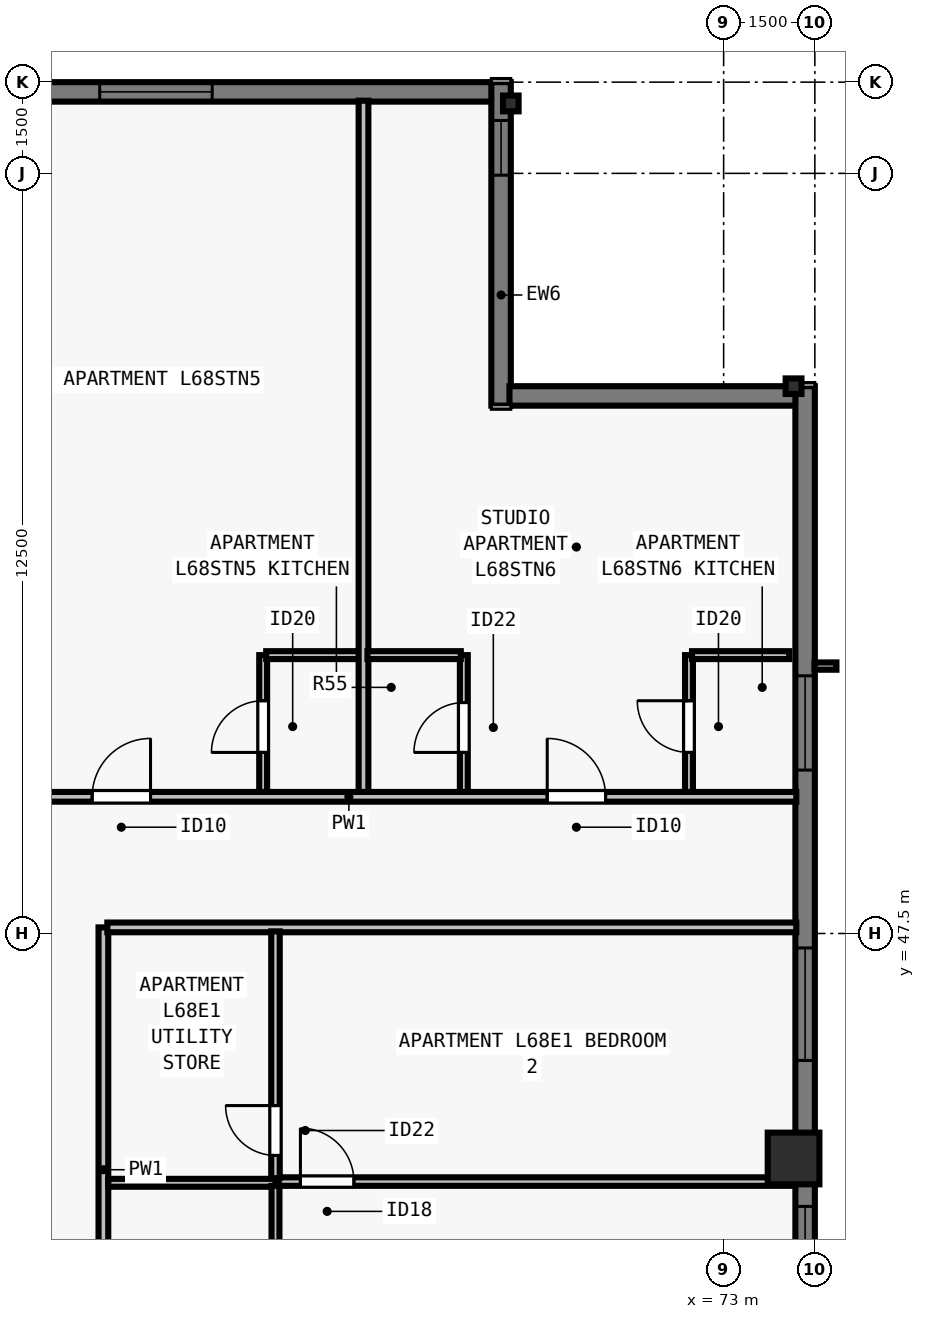
"""IFC4 building model, lengths in metres.
Left out: names, types, materials, properties, quantities, classifications, styles, units other than length and angle.
Written with IfcOpenShell. Run it as: python <this file> out.ifc"""

import sys

from ifc_helpers import new_model, si_unit, direction, frame, frame_2d, origin, origin_2d, place, context, subcontext, project, spatial, rectangle, i_section, extrude, element, fill, save


model = new_model("IFC4")
c1 = context("Model", 3, precision=1e-05, world=origin(), true_north=direction((0.0, 1.0)))
c2 = subcontext(c1, "Body", "Model", "MODEL_VIEW")
j1 = project(units=[si_unit("LENGTHUNIT", "METRE"), si_unit("PLANEANGLEUNIT", "RADIAN")], contexts=[c1])
p1 = place(None, origin())
s1 = spatial("IfcSite", under=j1, at=p1, CompositionType="ELEMENT")
p2 = place(p1, origin())
s2 = spatial("IfcBuilding", under=s1, at=p2, CompositionType="ELEMENT")
p3 = place(p2, frame((0.0, 0.0, 248.0)))
s3 = spatial("IfcBuildingStorey", under=s2, at=p3, CompositionType="ELEMENT", Elevation=248.0)
p4 = place(p3, frame((74.15, 43.8, 0.0), z_axis=(0.0, 0.0, 1.0), x_axis=(0.0, 1.0, 0.0)))
e1 = element("IfcColumn", 1, at=p4, inside=s3, PredefinedType="COLUMN", context=c2, shape_type="SweptSolid", body=[
    extrude(rectangle(XDim=0.85, YDim=0.85, at=origin_2d()), origin(), (0.0, 0.0, 1.0), 3.5),
])
for number, where, z_axis, x_axis in (
    (2, (74.15, 56.5, 0.0), (0.0, 0.0, 1.0), (0.0, 1.0, 0.0)),
    (3, (69.5, 61.15, 0.0), (0.0, 0.0, 1.0), (1.0, 0.0, 0.0)),
):
    element("IfcColumn", number, at=place(p3, frame(where, z_axis=z_axis, x_axis=x_axis)), inside=s3, PredefinedType="COLUMN", context=c2, shape_type="SweptSolid", body=[
        extrude(i_section(OverallWidth=0.256, OverallDepth=0.26, WebThickness=0.01, FlangeThickness=0.017, FilletRadius=0.013, at=origin_2d()), origin(), (0.0, 0.0, 1.0), 3.5),
    ])
p5 = place(p3, frame((34.5, 61.34, 0.0), z_axis=(0.0, 0.0, 1.0), x_axis=(1.0, 0.0, 0.0)))
e4 = element("IfcWall", 4, at=p5, inside=s3, PredefinedType="SOLIDWALL", context=c2, shape_type="SweptSolid", body=[
    extrude(rectangle(XDim=34.702, YDim=0.32, at=frame_2d((17.351, 0.0))), origin(), (0.0, 0.0, 1.0), 3.29),
])
p6 = place(p5, frame((4.763, 0.0, 0.8)))
e5 = element("IfcOpeningElement", 5, at=p6, cuts=e4, PredefinedType="OPENING", context=c2, shape_type="SweptSolid", body=[
    extrude(rectangle(XDim=1.55, YDim=1.678, at=frame_2d((0.775, 0.839))), frame((0.0, 0.17, 0.0), z_axis=(0.0, -1.0, 0.0), x_axis=(1.0, 0.0, 0.0)), (0.0, 0.0, 1.0), 0.34),
])
p7 = place(p5, frame((7.538, 0.0, 0.8)))
e6 = element("IfcOpeningElement", 6, at=p7, cuts=e4, PredefinedType="OPENING", context=c2, shape_type="SweptSolid", body=[
    extrude(rectangle(XDim=1.85, YDim=1.678, at=frame_2d((0.925, 0.839))), frame((0.0, 0.17, 0.0), z_axis=(0.0, -1.0, 0.0), x_axis=(1.0, 0.0, 0.0)), (0.0, 0.0, 1.0), 0.34),
])
p8 = place(p5, frame((10.263, 0.0, 0.8)))
e7 = element("IfcOpeningElement", 7, at=p8, cuts=e4, PredefinedType="OPENING", context=c2, shape_type="SweptSolid", body=[
    extrude(rectangle(XDim=1.55, YDim=1.678, at=frame_2d((0.775, 0.839))), frame((0.0, 0.17, 0.0), z_axis=(0.0, -1.0, 0.0), x_axis=(1.0, 0.0, 0.0)), (0.0, 0.0, 1.0), 0.34),
])
p9 = place(p5, frame((14.738, 0.0, 0.8)))
e8 = element("IfcOpeningElement", 8, at=p9, cuts=e4, PredefinedType="OPENING", context=c2, shape_type="SweptSolid", body=[
    extrude(rectangle(XDim=1.85, YDim=1.678, at=frame_2d((0.925, 0.839))), frame((0.0, 0.17, 0.0), z_axis=(0.0, -1.0, 0.0), x_axis=(1.0, 0.0, 0.0)), (0.0, 0.0, 1.0), 0.34),
])
p10 = place(p5, frame((18.264, 0.0, 0.8)))
e9 = element("IfcOpeningElement", 9, at=p10, cuts=e4, PredefinedType="OPENING", context=c2, shape_type="SweptSolid", body=[
    extrude(rectangle(XDim=1.55, YDim=1.678, at=frame_2d((0.775, 0.839))), frame((0.0, 0.17, 0.0), z_axis=(0.0, -1.0, 0.0), x_axis=(1.0, 0.0, 0.0)), (0.0, 0.0, 1.0), 0.34),
])
p11 = place(p5, frame((25.014, 0.0, 0.8)))
e10 = element("IfcOpeningElement", 10, at=p11, cuts=e4, PredefinedType="OPENING", context=c2, shape_type="SweptSolid", body=[
    extrude(rectangle(XDim=1.55, YDim=1.678, at=frame_2d((0.775, 0.839))), frame((0.0, 0.17, 0.0), z_axis=(0.0, -1.0, 0.0), x_axis=(1.0, 0.0, 0.0)), (0.0, 0.0, 1.0), 0.34),
])
p12 = place(p5, frame((28.24, 0.0, 0.8)))
e11 = element("IfcOpeningElement", 11, at=p12, cuts=e4, PredefinedType="OPENING", context=c2, shape_type="SweptSolid", body=[
    extrude(rectangle(XDim=1.85, YDim=1.678, at=frame_2d((0.925, 0.839))), frame((0.0, 0.17, 0.0), z_axis=(0.0, -1.0, 0.0), x_axis=(1.0, 0.0, 0.0)), (0.0, 0.0, 1.0), 0.34),
])
p13 = place(p3, frame((69.34, 61.5, 0.0), z_axis=(0.0, 0.0, 1.0), x_axis=(0.0, -1.0, 0.0)))
e12 = element("IfcWall", 12, at=p13, inside=s3, PredefinedType="SOLIDWALL", context=c2, shape_type="SweptSolid", body=[
    extrude(rectangle(XDim=5.32, YDim=0.32, at=frame_2d((2.66, 0.0))), origin(), (0.0, 0.0, 1.0), 3.29),
])
p14 = place(p13, frame((0.63, 0.0, 0.8)))
e13 = element("IfcOpeningElement", 13, at=p14, cuts=e12, PredefinedType="OPENING", context=c2, shape_type="SweptSolid", body=[
    extrude(rectangle(XDim=0.9, YDim=1.678, at=frame_2d((0.45, 0.839))), frame((0.0, 0.17, 0.0), z_axis=(0.0, -1.0, 0.0), x_axis=(1.0, 0.0, 0.0)), (0.0, 0.0, 1.0), 0.34),
])
p15 = place(p3, frame((69.478, 56.34, 0.0), z_axis=(0.0, 0.0, 1.0), x_axis=(1.0, 0.0, 0.0)))
e14 = element("IfcWall", 14, at=p15, inside=s3, PredefinedType="SOLIDWALL", context=c2, shape_type="SweptSolid", body=[
    extrude(rectangle(XDim=4.724, YDim=0.32, at=frame_2d((2.362, 0.0))), origin(), (0.0, 0.0, 1.0), 3.29),
])
p16 = place(p3, frame((74.34, 56.5, 0.0), z_axis=(0.0, 0.0, 1.0), x_axis=(0.0, -1.0, 0.0)))
e15 = element("IfcWall", 15, at=p16, inside=s3, PredefinedType="SOLIDWALL", context=c2, shape_type="SweptSolid", body=[
    extrude(rectangle(XDim=34.702, YDim=0.32, at=frame_2d((17.351, 0.0))), origin(), (0.0, 0.0, 1.0), 3.29),
])
p17 = place(p16, frame((4.763, 0.0, 0.8)))
e16 = element("IfcOpeningElement", 16, at=p17, cuts=e15, PredefinedType="OPENING", context=c2, shape_type="SweptSolid", body=[
    extrude(rectangle(XDim=1.55, YDim=1.678, at=frame_2d((0.775, 0.839))), frame((0.0, 0.17, 0.0), z_axis=(0.0, -1.0, 0.0), x_axis=(1.0, 0.0, 0.0)), (0.0, 0.0, 1.0), 0.34),
])
p18 = place(p16, frame((9.238, 0.0, 0.8)))
e17 = element("IfcOpeningElement", 17, at=p18, cuts=e15, PredefinedType="OPENING", context=c2, shape_type="SweptSolid", body=[
    extrude(rectangle(XDim=1.85, YDim=1.678, at=frame_2d((0.925, 0.839))), frame((0.0, 0.17, 0.0), z_axis=(0.0, -1.0, 0.0), x_axis=(1.0, 0.0, 0.0)), (0.0, 0.0, 1.0), 0.34),
])
p19 = place(p16, frame((13.488, 0.0, 0.8)))
e18 = element("IfcOpeningElement", 18, at=p19, cuts=e15, PredefinedType="OPENING", context=c2, shape_type="SweptSolid", body=[
    extrude(rectangle(XDim=1.85, YDim=1.678, at=frame_2d((0.925, 0.839))), frame((0.0, 0.17, 0.0), z_axis=(0.0, -1.0, 0.0), x_axis=(1.0, 0.0, 0.0)), (0.0, 0.0, 1.0), 0.34),
])
p20 = place(p16, frame((18.264, 0.0, 0.8)))
e19 = element("IfcOpeningElement", 19, at=p20, cuts=e15, PredefinedType="OPENING", context=c2, shape_type="SweptSolid", body=[
    extrude(rectangle(XDim=1.55, YDim=1.678, at=frame_2d((0.775, 0.839))), frame((0.0, 0.17, 0.0), z_axis=(0.0, -1.0, 0.0), x_axis=(1.0, 0.0, 0.0)), (0.0, 0.0, 1.0), 0.34),
])
p21 = place(p16, frame((24.164, 0.0, 0.8)))
e20 = element("IfcOpeningElement", 20, at=p21, cuts=e15, PredefinedType="OPENING", context=c2, shape_type="SweptSolid", body=[
    extrude(rectangle(XDim=1.55, YDim=1.678, at=frame_2d((0.775, 0.839))), frame((0.0, 0.17, 0.0), z_axis=(0.0, -1.0, 0.0), x_axis=(1.0, 0.0, 0.0)), (0.0, 0.0, 1.0), 0.34),
])
p22 = place(p16, frame((30.95, 0.0, 0.8)))
e21 = element("IfcOpeningElement", 21, at=p22, cuts=e15, PredefinedType="OPENING", context=c2, shape_type="SweptSolid", body=[
    extrude(rectangle(XDim=0.9, YDim=1.678, at=frame_2d((0.45, 0.839))), frame((0.0, 0.17, 0.0), z_axis=(0.0, -1.0, 0.0), x_axis=(1.0, 0.0, 0.0)), (0.0, 0.0, 1.0), 0.34),
])
p23 = place(p3, frame((29.805, 49.748, 0.0), z_axis=(0.0, 0.0, 1.0), x_axis=(1.0, 0.0, 0.0)))
e22 = element("IfcWall", 22, at=p23, inside=s3, PredefinedType="PARTITIONING", context=c2, shape_type="SweptSolid", body=[
    extrude(rectangle(XDim=44.39, YDim=0.16, at=frame_2d((22.195, 0.0))), origin(), (0.0, 0.0, 1.0), 2.958),
])
p24 = place(p23, frame((3.494, 0.0, 0.0)))
e23 = element("IfcOpeningElement", 23, at=p24, cuts=e22, PredefinedType="OPENING", context=c2, shape_type="SweptSolid", body=[
    extrude(rectangle(XDim=0.96, YDim=2.18, at=frame_2d((0.48, 1.09))), frame((0.0, 0.09, 0.0), z_axis=(0.0, -1.0, 0.0), x_axis=(1.0, 0.0, 0.0)), (0.0, 0.0, 1.0), 0.18),
])
p25 = place(p23, frame((10.73, 0.0, 0.0)))
e24 = element("IfcOpeningElement", 24, at=p25, cuts=e22, PredefinedType="OPENING", context=c2, shape_type="SweptSolid", body=[
    extrude(rectangle(XDim=0.96, YDim=2.18, at=frame_2d((0.48, 1.09))), frame((0.0, 0.09, 0.0), z_axis=(0.0, -1.0, 0.0), x_axis=(1.0, 0.0, 0.0)), (0.0, 0.0, 1.0), 0.18),
])
p26 = place(p23, frame((18.09, 0.0, 0.0)))
e25 = element("IfcOpeningElement", 25, at=p26, cuts=e22, PredefinedType="OPENING", context=c2, shape_type="SweptSolid", body=[
    extrude(rectangle(XDim=0.96, YDim=2.18, at=frame_2d((0.48, 1.09))), frame((0.0, 0.09, 0.0), z_axis=(0.0, -1.0, 0.0), x_axis=(1.0, 0.0, 0.0)), (0.0, 0.0, 1.0), 0.18),
])
p27 = place(p23, frame((25.45, 0.0, 0.0)))
e26 = element("IfcOpeningElement", 26, at=p27, cuts=e22, PredefinedType="OPENING", context=c2, shape_type="SweptSolid", body=[
    extrude(rectangle(XDim=0.96, YDim=2.18, at=frame_2d((0.48, 1.09))), frame((0.0, 0.09, 0.0), z_axis=(0.0, -1.0, 0.0), x_axis=(1.0, 0.0, 0.0)), (0.0, 0.0, 1.0), 0.18),
])
p28 = place(p23, frame((32.81, 0.0, 0.0)))
e27 = element("IfcOpeningElement", 27, at=p28, cuts=e22, PredefinedType="OPENING", context=c2, shape_type="SweptSolid", body=[
    extrude(rectangle(XDim=0.96, YDim=2.18, at=frame_2d((0.48, 1.09))), frame((0.0, 0.09, 0.0), z_axis=(0.0, -1.0, 0.0), x_axis=(1.0, 0.0, 0.0)), (0.0, 0.0, 1.0), 0.18),
])
p29 = place(p23, frame((40.294, 0.0, 0.0)))
e28 = element("IfcOpeningElement", 28, at=p29, cuts=e22, PredefinedType="OPENING", context=c2, shape_type="SweptSolid", body=[
    extrude(rectangle(XDim=0.96, YDim=2.18, at=frame_2d((0.48, 1.09))), frame((0.0, 0.09, 0.0), z_axis=(0.0, -1.0, 0.0), x_axis=(1.0, 0.0, 0.0)), (0.0, 0.0, 1.0), 0.18),
])
p30 = place(p3, frame((62.8, 30.4, 0.0), z_axis=(0.0, 0.0, 1.0), x_axis=(0.0, 1.0, 0.0)))
e29 = element("IfcWall", 29, at=p30, inside=s3, PredefinedType="PARTITIONING", context=c2, shape_type="SweptSolid", body=[
    extrude(rectangle(XDim=17.2, YDim=0.16, at=frame_2d((8.6, 0.0))), origin(), (0.0, 0.0, 1.0), 3.29),
])
p31 = place(p30, frame((8.12, 0.0, 0.0)))
e30 = element("IfcOpeningElement", 30, at=p31, cuts=e29, PredefinedType="OPENING", context=c2, shape_type="SweptSolid", body=[
    extrude(rectangle(XDim=0.96, YDim=2.18, at=frame_2d((0.48, 1.09))), frame((0.0, 0.09, 0.0), z_axis=(0.0, -1.0, 0.0), x_axis=(1.0, 0.0, 0.0)), (0.0, 0.0, 1.0), 0.18),
])
p32 = place(p3, frame((62.865, 47.6, 0.0), z_axis=(0.0, 0.0, 1.0), x_axis=(1.0, 0.0, 0.0)))
e31 = element("IfcWall", 31, at=p32, inside=s3, PredefinedType="PARTITIONING", context=c2, shape_type="SweptSolid", body=[
    extrude(rectangle(XDim=11.33, YDim=0.16, at=frame_2d((5.665, 0.0))), origin(), (0.0, 0.0, 1.0), 3.29),
])
p33 = place(p3, frame((65.427, 49.827, 0.0), z_axis=(0.0, 0.0, 1.0), x_axis=(0.0, 1.0, 0.0)))
e32 = element("IfcWall", 32, at=p33, inside=s3, PredefinedType="PLUMBINGWALL", context=c2, shape_type="SweptSolid", body=[
    extrude(rectangle(XDim=2.25, YDim=0.13, at=frame_2d((1.125, 0.0))), origin(), (0.0, 0.0, 1.0), 3.29),
])
p34 = place(p33, frame((0.65, 0.0, 0.0)))
e33 = element("IfcOpeningElement", 33, at=p34, cuts=e32, PredefinedType="OPENING", context=c2, shape_type="SweptSolid", body=[
    extrude(rectangle(XDim=0.85, YDim=2.1, at=frame_2d((0.425, 1.05))), frame((0.0, 0.075, 0.0), z_axis=(0.0, -1.0, 0.0), x_axis=(1.0, 0.0, 0.0)), (0.0, 0.0, 1.0), 0.15),
])
p35 = place(p3, frame((65.478, 52.077, 0.0), z_axis=(0.0, 0.0, 1.0), x_axis=(1.0, 0.0, 0.0)))
e34 = element("IfcWall", 34, at=p35, inside=s3, PredefinedType="PLUMBINGWALL", context=c2, shape_type="SweptSolid", body=[
    extrude(rectangle(XDim=1.6, YDim=0.13, at=frame_2d((0.8, 0.0))), origin(), (0.0, 0.0, 1.0), 3.29),
])
p36 = place(p3, frame((67.077, 49.827, 0.0), z_axis=(0.0, 0.0, 1.0), x_axis=(0.0, 1.0, 0.0)))
e35 = element("IfcWall", 35, at=p36, inside=s3, PredefinedType="PARTITIONING", context=c2, shape_type="SweptSolid", body=[
    extrude(rectangle(XDim=11.368, YDim=0.16, at=frame_2d((5.684, 0.0))), origin(), (0.0, 0.0, 1.0), 2.573),
])
p37 = place(p3, frame((68.728, 49.827, 0.0), z_axis=(0.0, 0.0, 1.0), x_axis=(0.0, 1.0, 0.0)))
e36 = element("IfcWall", 36, at=p37, inside=s3, PredefinedType="PLUMBINGWALL", context=c2, shape_type="SweptSolid", body=[
    extrude(rectangle(XDim=2.25, YDim=0.13, at=frame_2d((1.125, 0.0))), origin(), (0.0, 0.0, 1.0), 3.29),
])
p38 = place(p37, frame((0.65, 0.0, 0.0)))
e37 = element("IfcOpeningElement", 37, at=p38, cuts=e36, PredefinedType="OPENING", context=c2, shape_type="SweptSolid", body=[
    extrude(rectangle(XDim=0.82, YDim=2.1, at=frame_2d((0.41, 1.05))), frame((0.0, 0.075, 0.0), z_axis=(0.0, -1.0, 0.0), x_axis=(1.0, 0.0, 0.0)), (0.0, 0.0, 1.0), 0.15),
])
p39 = place(p3, frame((67.143, 52.077, 0.0), z_axis=(0.0, 0.0, 1.0), x_axis=(1.0, 0.0, 0.0)))
e38 = element("IfcWall", 38, at=p39, inside=s3, PredefinedType="PLUMBINGWALL", context=c2, shape_type="SweptSolid", body=[
    extrude(rectangle(XDim=1.535, YDim=0.13, at=frame_2d((0.768, 0.0))), origin(), (0.0, 0.0, 1.0), 2.958),
])
p40 = place(p3, frame((72.43, 49.827, 0.0), z_axis=(0.0, 0.0, 1.0), x_axis=(0.0, 1.0, 0.0)))
e39 = element("IfcWall", 39, at=p40, inside=s3, PredefinedType="PLUMBINGWALL", context=c2, shape_type="SweptSolid", body=[
    extrude(rectangle(XDim=2.25, YDim=0.13, at=frame_2d((1.125, 0.0))), origin(), (0.0, 0.0, 1.0), 3.29),
])
p41 = place(p40, frame((0.65, 0.0, 0.0)))
e40 = element("IfcOpeningElement", 40, at=p41, cuts=e39, PredefinedType="OPENING", context=c2, shape_type="SweptSolid", body=[
    extrude(rectangle(XDim=0.85, YDim=2.1, at=frame_2d((0.425, 1.05))), frame((0.0, 0.075, 0.0), z_axis=(0.0, -1.0, 0.0), x_axis=(1.0, 0.0, 0.0)), (0.0, 0.0, 1.0), 0.15),
])
p42 = place(p3, frame((72.48, 52.077, 0.0), z_axis=(0.0, 0.0, 1.0), x_axis=(1.0, 0.0, 0.0)))
e41 = element("IfcWall", 41, at=p42, inside=s3, PredefinedType="PLUMBINGWALL", context=c2, shape_type="SweptSolid", body=[
    extrude(rectangle(XDim=1.6, YDim=0.13, at=frame_2d((0.8, 0.0))), origin(), (0.0, 0.0, 1.0), 3.29),
])
p43 = place(p3, frame((62.88, 43.4, 0.0), z_axis=(0.0, 0.0, 1.0), x_axis=(1.0, 0.0, 0.0)))
e42 = element("IfcWall", 42, at=p43, inside=s3, PredefinedType="PLUMBINGWALL", context=c2, shape_type="SweptSolid", body=[
    extrude(rectangle(XDim=2.75, YDim=0.13, at=frame_2d((1.375, 0.0))), origin(), (0.0, 0.0, 1.0), 3.29),
])
p44 = place(p3, frame((65.63, 40.2, 0.0), z_axis=(0.0, 0.0, 1.0), x_axis=(0.0, 1.0, 0.0)))
e43 = element("IfcWall", 43, at=p44, inside=s3, PredefinedType="PLUMBINGWALL", context=c2, shape_type="SweptSolid", body=[
    extrude(rectangle(XDim=3.15, YDim=0.13, at=frame_2d((1.575, 0.0))), origin(), (0.0, 0.0, 1.0), 3.29),
])
p45 = place(p3, frame((65.68, 43.42, 0.0), z_axis=(0.0, 0.0, 1.0), x_axis=(1.0, 0.0, 0.0)))
e44 = element("IfcWall", 44, at=p45, inside=s3, PredefinedType="PARTITIONING", context=c2, shape_type="SweptSolid", body=[
    extrude(rectangle(XDim=8.44, YDim=0.14, at=frame_2d((4.22, 0.0))), origin(), (0.0, 0.0, 1.0), 3.29),
])
p46 = place(p45, frame((0.36, 0.0, 0.0)))
e45 = element("IfcOpeningElement", 45, at=p46, cuts=e44, PredefinedType="OPENING", context=c2, shape_type="SweptSolid", body=[
    extrude(rectangle(XDim=0.88, YDim=2.1, at=frame_2d((0.44, 1.05))), frame((0.0, 0.08, 0.0), z_axis=(0.0, -1.0, 0.0), x_axis=(1.0, 0.0, 0.0)), (0.0, 0.0, 1.0), 0.16),
])
p47 = place(p3, frame((65.63, 43.475, 0.0), z_axis=(0.0, 0.0, 1.0), x_axis=(0.0, 1.0, 0.0)))
e46 = element("IfcWall", 46, at=p47, inside=s3, PredefinedType="PARTITIONING", context=c2, shape_type="SweptSolid", body=[
    extrude(rectangle(XDim=4.06, YDim=0.14, at=frame_2d((2.03, 0.0))), origin(), (0.0, 0.0, 1.0), 3.29),
])
p48 = place(p47, frame((0.375, 0.0, 0.0)))
e47 = element("IfcOpeningElement", 47, at=p48, cuts=e46, PredefinedType="OPENING", context=c2, shape_type="SweptSolid", body=[
    extrude(rectangle(XDim=0.82, YDim=2.1, at=frame_2d((0.41, 1.05))), frame((0.0, 0.08, 0.0), z_axis=(0.0, -1.0, 0.0), x_axis=(1.0, 0.0, 0.0)), (0.0, 0.0, 1.0), 0.16),
])
p49 = place(p12, origin())
e48 = element("IfcWindow", 48, at=p49, inside=s3, PartitioningType="SINGLE_PANEL", PredefinedType="WINDOW", context=c2, shape_type="SweptSolid", body=[
    extrude(rectangle(XDim=1.85, YDim=1.678, at=frame_2d((0.925, 0.839))), frame((0.0, -0.05, 0.0), z_axis=(0.0, -1.0, 0.0), x_axis=(1.0, 0.0, 0.0)), (0.0, 0.0, 1.0), 0.06),
])
fill(e11, e48)
p50 = place(p17, origin())
e49 = element("IfcWindow", 49, at=p50, inside=s3, PartitioningType="SINGLE_PANEL", PredefinedType="WINDOW", context=c2, shape_type="SweptSolid", body=[
    extrude(rectangle(XDim=1.55, YDim=1.678, at=frame_2d((0.775, 0.839))), frame((0.0, -0.05, 0.0), z_axis=(0.0, -1.0, 0.0), x_axis=(1.0, 0.0, 0.0)), (0.0, 0.0, 1.0), 0.06),
])
fill(e16, e49)
p51 = place(p18, origin())
e50 = element("IfcWindow", 50, at=p51, inside=s3, PartitioningType="SINGLE_PANEL", PredefinedType="WINDOW", context=c2, shape_type="SweptSolid", body=[
    extrude(rectangle(XDim=1.85, YDim=1.678, at=frame_2d((0.925, 0.839))), frame((0.0, -0.05, 0.0), z_axis=(0.0, -1.0, 0.0), x_axis=(1.0, 0.0, 0.0)), (0.0, 0.0, 1.0), 0.06),
])
fill(e17, e50)
p52 = place(p19, origin())
e51 = element("IfcWindow", 51, at=p52, inside=s3, PartitioningType="SINGLE_PANEL", PredefinedType="WINDOW", context=c2, shape_type="SweptSolid", body=[
    extrude(rectangle(XDim=1.85, YDim=1.678, at=frame_2d((0.925, 0.839))), frame((0.0, -0.05, 0.0), z_axis=(0.0, -1.0, 0.0), x_axis=(1.0, 0.0, 0.0)), (0.0, 0.0, 1.0), 0.06),
])
fill(e18, e51)
p53 = place(p14, origin())
e52 = element("IfcWindow", 52, at=p53, inside=s3, PartitioningType="SINGLE_PANEL", PredefinedType="WINDOW", context=c2, shape_type="SweptSolid", body=[
    extrude(rectangle(XDim=0.9, YDim=1.678, at=frame_2d((0.45, 0.839))), frame((0.0, -0.04, 0.0), z_axis=(0.0, -1.0, 0.0), x_axis=(1.0, 0.0, 0.0)), (0.0, 0.0, 1.0), 0.06),
])
fill(e13, e52)
p54 = place(p34, origin())
e53 = element("IfcDoor", 53, at=p54, inside=s3, OperationType="SINGLE_SWING_LEFT", PredefinedType="DOOR", context=c2, shape_type="SweptSolid", body=[
    extrude(rectangle(XDim=0.85, YDim=2.1, at=frame_2d((0.425, 1.05))), frame((0.0, 0.025, 0.0), z_axis=(0.0, -1.0, 0.0), x_axis=(1.0, 0.0, 0.0)), (0.0, 0.0, 1.0), 0.05),
])
fill(e33, e53)
p55 = place(p28, origin())
e54 = element("IfcDoor", 54, at=p55, inside=s3, OperationType="SINGLE_SWING_RIGHT", PredefinedType="DOOR", context=c2, shape_type="SweptSolid", body=[
    extrude(rectangle(XDim=0.96, YDim=2.18, at=frame_2d((0.48, 1.09))), frame((0.0, 0.025, 0.0), z_axis=(0.0, -1.0, 0.0), x_axis=(1.0, 0.0, 0.0)), (0.0, 0.0, 1.0), 0.05),
])
fill(e27, e54)
p56 = place(p38, origin())
e55 = element("IfcDoor", 55, at=p56, inside=s3, OperationType="SINGLE_SWING_LEFT", PredefinedType="DOOR", context=c2, shape_type="SweptSolid", body=[
    extrude(rectangle(XDim=0.82, YDim=2.1, at=frame_2d((0.41, 1.05))), frame((0.0, 0.025, 0.0), z_axis=(0.0, -1.0, 0.0), x_axis=(1.0, 0.0, 0.0)), (0.0, 0.0, 1.0), 0.05),
])
fill(e37, e55)
p57 = place(p41, origin())
e56 = element("IfcDoor", 56, at=p57, inside=s3, OperationType="SINGLE_SWING_RIGHT", PredefinedType="DOOR", context=c2, shape_type="SweptSolid", body=[
    extrude(rectangle(XDim=0.85, YDim=2.1, at=frame_2d((0.425, 1.05))), frame((0.0, 0.025, 0.0), z_axis=(0.0, -1.0, 0.0), x_axis=(1.0, 0.0, 0.0)), (0.0, 0.0, 1.0), 0.05),
])
fill(e40, e56)
p58 = place(p29, origin())
e57 = element("IfcDoor", 57, at=p58, inside=s3, OperationType="SINGLE_SWING_LEFT", PredefinedType="DOOR", context=c2, shape_type="SweptSolid", body=[
    extrude(rectangle(XDim=0.96, YDim=2.18, at=frame_2d((0.48, 1.09))), frame((0.0, 0.025, 0.0), z_axis=(0.0, -1.0, 0.0), x_axis=(1.0, 0.0, 0.0)), (0.0, 0.0, 1.0), 0.05),
])
fill(e28, e57)
p59 = place(p48, origin())
e58 = element("IfcDoor", 58, at=p59, inside=s3, OperationType="SINGLE_SWING_RIGHT", PredefinedType="DOOR", context=c2, shape_type="SweptSolid", body=[
    extrude(rectangle(XDim=0.82, YDim=2.1, at=frame_2d((0.41, 1.05))), frame((0.0, 0.025, 0.0), z_axis=(0.0, -1.0, 0.0), x_axis=(1.0, 0.0, 0.0)), (0.0, 0.0, 1.0), 0.05),
])
fill(e47, e58)
p60 = place(p46, origin())
e59 = element("IfcDoor", 59, at=p60, inside=s3, OperationType="SINGLE_SWING_LEFT", PredefinedType="DOOR", context=c2, shape_type="SweptSolid", body=[
    extrude(rectangle(XDim=0.88, YDim=2.1, at=frame_2d((0.44, 1.05))), frame((0.0, 0.025, 0.0), z_axis=(0.0, -1.0, 0.0), x_axis=(1.0, 0.0, 0.0)), (0.0, 0.0, 1.0), 0.05),
])
fill(e45, e59)
save(model, sys.argv[1])
